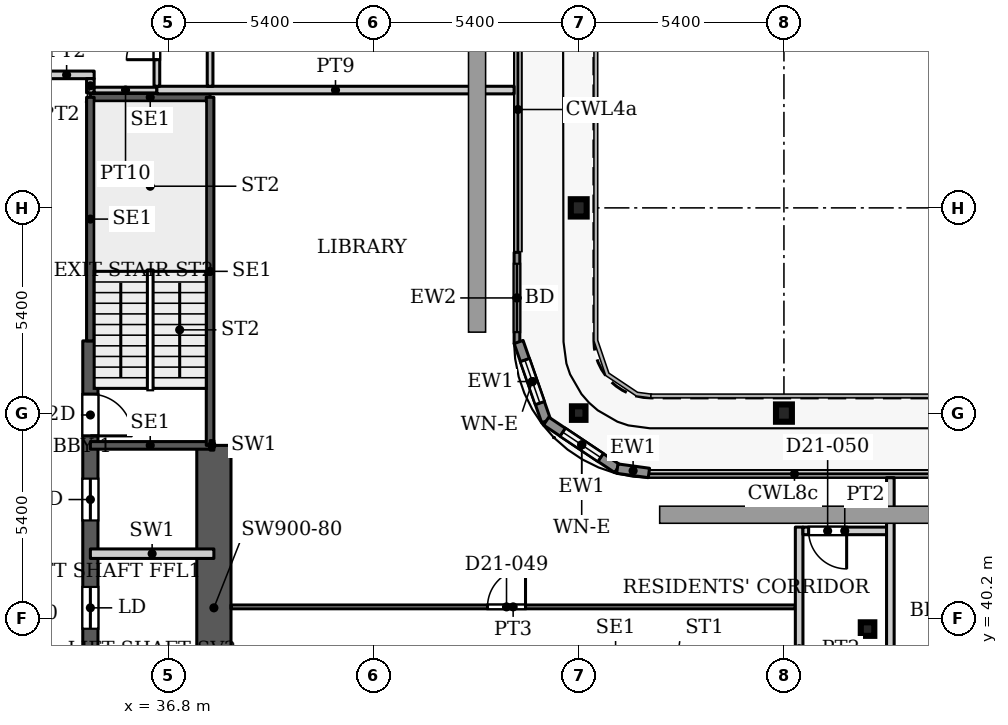
"""IFC4 building model, lengths in metres.
Left out: names, types, materials, properties, quantities, classifications, styles, units other than length and angle.
Written with IfcOpenShell. Run it as: python <this file> out.ifc"""

import sys

from ifc_helpers import new_model, si_unit, direction, frame, frame_2d, origin, origin_2d, place, context, subcontext, project, spatial, rectangle, hollow_rectangle, i_section, extrude, source, transform, mapped, element, fill, save


model = new_model("IFC4")
c1 = context("Model", 3, precision=1e-05, world=origin(), true_north=direction((0.0, 1.0)))
c2 = subcontext(c1, "Body", "Model", "MODEL_VIEW")
j1 = project(units=[si_unit("LENGTHUNIT", "METRE"), si_unit("PLANEANGLEUNIT", "RADIAN")], contexts=[c1])
p1 = place(None, origin())
s1 = spatial("IfcSite", under=j1, at=p1, CompositionType="ELEMENT")
p2 = place(p1, origin())
s2 = spatial("IfcBuilding", under=s1, at=p2, CompositionType="ELEMENT")
p3 = place(p2, frame((0.0, 0.0, 98.0)))
s3 = spatial("IfcBuildingStorey", under=s2, at=p3, CompositionType="ELEMENT", Elevation=98.0)
for number, where, z_axis, x_axis in (
    (1, (53.0, 45.6, 0.0), (0.0, 0.0, 1.0), (1.0, 0.0, 0.0)),
    (2, (47.6, 51.0, 0.0), (0.0, 0.0, 1.0), (1.0, 0.0, 0.0)),
):
    element("IfcColumn", number, at=place(p3, frame(where, z_axis=z_axis, x_axis=x_axis)), inside=s3, PredefinedType="COLUMN", context=c2, shape_type="SweptSolid", body=[
        extrude(i_section(OverallWidth=0.418, OverallDepth=0.455, WebThickness=0.042, FlangeThickness=0.068, FilletRadius=0.014, at=origin_2d()), origin(), (0.0, 0.0, 1.0), 3.9),
    ])
for number, where, z_axis, x_axis in (
    (3, (55.2, 39.916, 0.0), (0.0, 0.0, 1.0), (1.0, 0.0, 0.0)),
    (4, (47.6, 45.6, 0.0), (0.0, 0.0, 1.0), (1.0, 0.0, 0.0)),
):
    element("IfcColumn", number, at=place(p3, frame(where, z_axis=z_axis, x_axis=x_axis)), inside=s3, PredefinedType="COLUMN", context=c2, shape_type="SweptSolid", body=[
        extrude(hollow_rectangle(XDim=0.356, YDim=0.356, WallThickness=0.016, InnerFilletRadius=0.016, OuterFilletRadius=0.032, at=origin_2d()), origin(), (0.0, 0.0, 1.0), 3.9),
    ])
p4 = place(p3, frame((34.75, 29.05, 0.0), z_axis=(0.0, 0.0, 1.0), x_axis=(0.0, 1.0, 0.0)))
e5 = element("IfcWall", 5, at=p4, inside=s3, PredefinedType="SHEAR", context=c2, shape_type="SweptSolid", body=[
    extrude(rectangle(XDim=18.45, YDim=0.4, at=frame_2d((9.225, 0.0))), origin(), (0.0, 0.0, 1.0), 3.9),
])
p5 = place(p4, frame((8.025, 0.0, 0.0)))
e6 = element("IfcOpeningElement", 6, at=p5, cuts=e5, PredefinedType="OPENING", context=c2, shape_type="SweptSolid", body=[
    extrude(rectangle(XDim=1.1, YDim=2.2, at=frame_2d((0.55, 1.1))), frame((0.0, 0.21, 0.0), z_axis=(0.0, -1.0, 0.0), x_axis=(1.0, 0.0, 0.0)), (0.0, 0.0, 1.0), 0.42),
])
p6 = place(p4, frame((10.875, 0.0, 0.0)))
e7 = element("IfcOpeningElement", 7, at=p6, cuts=e5, PredefinedType="OPENING", context=c2, shape_type="SweptSolid", body=[
    extrude(rectangle(XDim=1.1, YDim=2.2, at=frame_2d((0.55, 1.1))), frame((0.0, 0.21, 0.0), z_axis=(0.0, -1.0, 0.0), x_axis=(1.0, 0.0, 0.0)), (0.0, 0.0, 1.0), 0.42),
])
p7 = place(p4, frame((13.725, 0.0, 0.0)))
e8 = element("IfcOpeningElement", 8, at=p7, cuts=e5, PredefinedType="OPENING", context=c2, shape_type="SweptSolid", body=[
    extrude(rectangle(XDim=1.1, YDim=2.2, at=frame_2d((0.55, 1.1))), frame((0.0, 0.21, 0.0), z_axis=(0.0, -1.0, 0.0), x_axis=(1.0, 0.0, 0.0)), (0.0, 0.0, 1.0), 0.42),
])
p8 = place(p4, frame((15.95, 0.0, 0.0)))
e9 = element("IfcOpeningElement", 9, at=p8, cuts=e5, PredefinedType="OPENING", context=c2, shape_type="SweptSolid", body=[
    extrude(rectangle(XDim=1.1, YDim=2.2, at=frame_2d((0.55, 1.1))), frame((0.0, 0.21, 0.0), z_axis=(0.0, -1.0, 0.0), x_axis=(1.0, 0.0, 0.0)), (0.0, 0.0, 1.0), 0.42),
])
p9 = place(p3, frame((38.0, 36.2, 0.0), z_axis=(0.0, 0.0, 1.0), x_axis=(0.0, 1.0, 0.0)))
e10 = element("IfcWall", 10, at=p9, inside=s3, PredefinedType="SHEAR", context=c2, shape_type="SweptSolid", body=[
    extrude(rectangle(XDim=8.55, YDim=0.9, at=frame_2d((4.275, 0.0))), origin(), (0.0, 0.0, 1.0), 3.9),
])
p10 = place(p3, frame((45.975, 49.83, 0.0), z_axis=(0.0, 0.0, 1.0), x_axis=(0.0, -1.0, 0.0)))
e11 = element("IfcWall", 11, at=p10, inside=s3, PredefinedType="SOLIDWALL", context=c2, shape_type="SweptSolid", body=[
    extrude(rectangle(XDim=2.4, YDim=0.15, at=frame_2d((1.2, 0.0))), origin(), (0.0, 0.0, 1.0), 3.75),
])
p11 = place(p10, frame((0.3, 0.0, 0.0)))
e12 = element("IfcOpeningElement", 12, at=p11, cuts=e11, PredefinedType="OPENING", context=c2, shape_type="SweptSolid", body=[
    extrude(rectangle(XDim=1.8, YDim=2.4, at=frame_2d((0.9, 1.2))), frame((0.0, 0.085, 0.0), z_axis=(0.0, -1.0, 0.0), x_axis=(1.0, 0.0, 0.0)), (0.0, 0.0, 1.0), 0.17),
])
p12 = place(p3, frame((46.018, 47.471, 0.0), z_axis=(0.0, 0.0, 1.0), x_axis=(0.328791208903, -0.944402637093, 0.0)))
e13 = element("IfcWall", 13, at=p12, inside=s3, PredefinedType="SOLIDWALL", context=c2, shape_type="SweptSolid", body=[
    extrude(rectangle(XDim=2.205, YDim=0.25, at=frame_2d((1.102, 0.0))), origin(), (0.0, 0.0, 1.0), 3.75),
])
p13 = place(p12, frame((0.503, 0.0, 0.6)))
e14 = element("IfcOpeningElement", 14, at=p13, cuts=e13, PredefinedType="OPENING", context=c2, shape_type="SweptSolid", body=[
    extrude(rectangle(XDim=1.2, YDim=2.1, at=frame_2d((0.6, 1.05))), frame((0.0, 0.135, 0.0), z_axis=(0.0, -1.0, 0.0), x_axis=(1.0, 0.0, 0.0)), (0.0, 0.0, 1.0), 0.27),
])
p14 = place(p3, frame((46.743, 45.389, 0.0), z_axis=(0.0, 0.0, 1.0), x_axis=(0.831449265529, -0.555600682912, 0.0)))
e15 = element("IfcWall", 15, at=p14, inside=s3, PredefinedType="SOLIDWALL", context=c2, shape_type="SweptSolid", body=[
    extrude(rectangle(XDim=2.251, YDim=0.25, at=frame_2d((1.126, 0.0))), origin(), (0.0, 0.0, 1.0), 3.75),
])
p15 = place(p14, frame((0.525, 0.0, 0.6)))
e16 = element("IfcOpeningElement", 16, at=p15, cuts=e15, PredefinedType="OPENING", context=c2, shape_type="SweptSolid", body=[
    extrude(rectangle(XDim=1.2, YDim=2.1, at=frame_2d((0.6, 1.05))), frame((0.0, 0.135, 0.0), z_axis=(0.0, -1.0, 0.0), x_axis=(1.0, 0.0, 0.0)), (0.0, 0.0, 1.0), 0.27),
])
p16 = place(p3, frame((48.615, 44.138, 0.0), z_axis=(0.0, 0.0, 1.0), x_axis=(0.990741504246, -0.135761819977, 0.0)))
e17 = element("IfcWall", 17, at=p16, inside=s3, PredefinedType="SOLIDWALL", context=c2, shape_type="SweptSolid", body=[
    extrude(rectangle(XDim=0.84, YDim=0.25, at=frame_2d((0.42, 0.0))), origin(), (0.0, 0.0, 1.0), 3.75),
])
for number, where, z_axis, x_axis in (
    (18, (34.75, 44.75, 0.0), (0.0, 0.0, 1.0), (1.0, 0.0, 0.0)),
    (19, (34.75, 53.91, 0.0), (0.0, 0.0, 1.0), (1.0, 0.0, 0.0)),
):
    element("IfcWall", number, at=place(p3, frame(where, z_axis=z_axis, x_axis=x_axis)), inside=s3, PredefinedType="SHEAR", context=c2, shape_type="SweptSolid", body=[
        extrude(rectangle(XDim=3.15, YDim=0.2, at=frame_2d((1.575, 0.0))), origin(), (0.0, 0.0, 1.0), 3.9),
    ])
p17 = place(p3, frame((34.75, 47.5, 0.0), z_axis=(0.0, 0.0, 1.0), x_axis=(0.0, 1.0, 0.0)))
e20 = element("IfcWall", 20, at=p17, inside=s3, PredefinedType="SHEAR", context=c2, shape_type="SweptSolid", body=[
    extrude(rectangle(XDim=6.41, YDim=0.2, at=frame_2d((3.205, 0.0))), origin(), (0.0, 0.0, 1.0), 3.9),
])
p18 = place(p3, frame((37.9, 44.75, 0.0), z_axis=(0.0, 0.0, 1.0), x_axis=(0.0, 1.0, 0.0)))
e21 = element("IfcWall", 21, at=p18, inside=s3, PredefinedType="SHEAR", context=c2, shape_type="SweptSolid", body=[
    extrude(rectangle(XDim=9.16, YDim=0.2, at=frame_2d((4.58, 0.0))), origin(), (0.0, 0.0, 1.0), 3.9),
])
p19 = place(p3, frame((34.75, 41.9, 0.0), z_axis=(0.0, 0.0, 1.0), x_axis=(1.0, 0.0, 0.0)))
e22 = element("IfcWall", 22, at=p19, inside=s3, PredefinedType="PARTITIONING", context=c2, shape_type="SweptSolid", body=[
    extrude(rectangle(XDim=3.25, YDim=0.25, at=frame_2d((1.625, 0.0))), origin(), (0.0, 0.0, 1.0), 3.9),
])
p20 = place(p3, frame((37.9, 44.75, 0.0), z_axis=(0.0, 0.0, 1.0), x_axis=(1.0, 0.0, 0.0)))
e23 = element("IfcWall", 23, at=p20, inside=s3, PredefinedType="PARTITIONING", context=c2, shape_type="SweptSolid", body=[
    extrude(rectangle(XDim=0.1, YDim=0.25, at=frame_2d((0.05, 0.0))), origin(), (0.0, 0.0, 1.0), 3.9),
])
p21 = place(p3, frame((33.4, 54.5, 0.0), z_axis=(0.0, 0.0, 1.0), x_axis=(1.0, 0.0, 0.0)))
e24 = element("IfcWall", 24, at=p21, inside=s3, PredefinedType="PARTITIONING", context=c2, shape_type="SweptSolid", body=[
    extrude(rectangle(XDim=1.45, YDim=0.2, at=frame_2d((0.725, 0.0))), origin(), (0.0, 0.0, 1.0), 3.6),
])
p22 = place(p3, frame((34.75, 54.025, 0.0), z_axis=(0.0, 0.0, 1.0), x_axis=(0.0, 1.0, 0.0)))
e25 = element("IfcWall", 25, at=p22, inside=s3, PredefinedType="PARTITIONING", context=c2, shape_type="SweptSolid", body=[
    extrude(rectangle(XDim=0.375, YDim=0.2, at=frame_2d((0.188, 0.0))), origin(), (0.0, 0.0, 1.0), 3.6),
])
p23 = place(p3, frame((34.85, 54.1, 0.0), z_axis=(0.0, 0.0, 1.0), x_axis=(1.0, 0.0, 0.0)))
e26 = element("IfcWall", 26, at=p23, inside=s3, PredefinedType="PARTITIONING", context=c2, shape_type="SweptSolid", body=[
    extrude(rectangle(XDim=1.65, YDim=0.15, at=frame_2d((0.825, 0.0))), origin(), (0.0, 0.0, 1.0), 3.6),
])
p24 = place(p3, frame((36.5, 54.1, 0.0), z_axis=(0.0, 0.0, 1.0), x_axis=(1.0, 0.0, 0.0)))
e27 = element("IfcWall", 27, at=p24, inside=s3, PredefinedType="PARTITIONING", context=c2, shape_type="SweptSolid", body=[
    extrude(rectangle(XDim=9.4, YDim=0.2, at=frame_2d((4.7, 0.0))), origin(), (0.0, 0.0, 1.0), 3.6),
])
p25 = place(p3, frame((36.5, 54.2, 0.0), z_axis=(0.0, 0.0, 1.0), x_axis=(0.0, 1.0, 0.0)))
e28 = element("IfcWall", 28, at=p25, inside=s3, PredefinedType="PARTITIONING", context=c2, shape_type="SweptSolid", body=[
    extrude(rectangle(XDim=5.35, YDim=0.15, at=frame_2d((2.675, 0.0))), origin(), (0.0, 0.0, 1.0), 3.6),
])
p26 = place(p25, frame((0.7, 0.0, 0.0)))
e29 = element("IfcOpeningElement", 29, at=p26, cuts=e28, PredefinedType="OPENING", context=c2, shape_type="SweptSolid", body=[
    extrude(rectangle(XDim=0.8, YDim=2.1, at=frame_2d((0.4, 1.05))), frame((0.0, 0.085, 0.0), z_axis=(0.0, -1.0, 0.0), x_axis=(1.0, 0.0, 0.0)), (0.0, 0.0, 1.0), 0.17),
])
p27 = place(p25, frame((3.35, 0.0, 0.0)))
e30 = element("IfcOpeningElement", 30, at=p27, cuts=e28, PredefinedType="OPENING", context=c2, shape_type="SweptSolid", body=[
    extrude(rectangle(XDim=0.9, YDim=2.1, at=frame_2d((0.45, 1.05))), frame((0.0, 0.085, 0.0), z_axis=(0.0, -1.0, 0.0), x_axis=(1.0, 0.0, 0.0)), (0.0, 0.0, 1.0), 0.17),
])
p28 = place(p3, frame((37.9, 54.2, 0.0), z_axis=(0.0, 0.0, 1.0), x_axis=(0.0, 1.0, 0.0)))
e31 = element("IfcWall", 31, at=p28, inside=s3, PredefinedType="PARTITIONING", context=c2, shape_type="SweptSolid", body=[
    extrude(rectangle(XDim=8.5, YDim=0.15, at=frame_2d((4.25, 0.0))), origin(), (0.0, 0.0, 1.0), 3.6),
])
p29 = place(p28, frame((1.1, 0.0, 0.0)))
e32 = element("IfcOpeningElement", 32, at=p29, cuts=e31, PredefinedType="OPENING", context=c2, shape_type="SweptSolid", body=[
    extrude(rectangle(XDim=0.9, YDim=2.1, at=frame_2d((0.45, 1.05))), frame((0.0, 0.085, 0.0), z_axis=(0.0, -1.0, 0.0), x_axis=(1.0, 0.0, 0.0)), (0.0, 0.0, 1.0), 0.17),
])
p30 = place(p28, frame((5.4, 0.0, 0.0)))
e33 = element("IfcOpeningElement", 33, at=p30, cuts=e31, PredefinedType="OPENING", context=c2, shape_type="SweptSolid", body=[
    extrude(rectangle(XDim=1.0, YDim=2.1, at=frame_2d((0.5, 1.05))), frame((0.0, 0.085, 0.0), z_axis=(0.0, -1.0, 0.0), x_axis=(1.0, 0.0, 0.0)), (0.0, 0.0, 1.0), 0.17),
])
p31 = place(p3, frame((38.449, 40.5, 0.0), z_axis=(0.0, 0.0, 1.0), x_axis=(1.0, 0.0, 0.0)))
e34 = element("IfcWall", 34, at=p31, inside=s3, PredefinedType="PARTITIONING", context=c2, shape_type="SweptSolid", body=[
    extrude(rectangle(XDim=14.851, YDim=0.1, at=frame_2d((7.426, 0.0))), origin(), (0.0, 0.0, 1.0), 3.6),
])
p32 = place(p31, frame((6.751, 0.0, 0.0)))
e35 = element("IfcOpeningElement", 35, at=p32, cuts=e34, PredefinedType="OPENING", context=c2, shape_type="SweptSolid", body=[
    extrude(rectangle(XDim=1.0, YDim=2.1, at=frame_2d((0.5, 1.05))), frame((0.0, 0.06, 0.0), z_axis=(0.0, -1.0, 0.0), x_axis=(1.0, 0.0, 0.0)), (0.0, 0.0, 1.0), 0.12),
])
p33 = place(p3, frame((53.4, 36.199, 0.0), z_axis=(0.0, 0.0, 1.0), x_axis=(0.0, 1.0, 0.0)))
e36 = element("IfcWall", 36, at=p33, inside=s3, PredefinedType="PARTITIONING", context=c2, shape_type="SweptSolid", body=[
    extrude(rectangle(XDim=6.401, YDim=0.2, at=frame_2d((3.201, 0.0))), origin(), (0.0, 0.0, 1.0), 3.6),
])
p34 = place(p3, frame((53.5, 42.5, 0.0), z_axis=(0.0, 0.0, 1.0), x_axis=(1.0, 0.0, 0.0)))
e37 = element("IfcWall", 37, at=p34, inside=s3, PredefinedType="PARTITIONING", context=c2, shape_type="SweptSolid", body=[
    extrude(rectangle(XDim=2.2, YDim=0.2, at=frame_2d((1.1, 0.0))), origin(), (0.0, 0.0, 1.0), 3.6),
])
p35 = place(p34, frame((0.15, 0.0, 0.0)))
e38 = element("IfcOpeningElement", 38, at=p35, cuts=e37, PredefinedType="OPENING", context=c2, shape_type="SweptSolid", body=[
    extrude(rectangle(XDim=1.0, YDim=2.1, at=frame_2d((0.5, 1.05))), frame((0.0, 0.11, 0.0), z_axis=(0.0, -1.0, 0.0), x_axis=(1.0, 0.0, 0.0)), (0.0, 0.0, 1.0), 0.22),
])
p36 = place(p3, frame((55.8, 30.4, 0.0), z_axis=(0.0, 0.0, 1.0), x_axis=(0.0, 1.0, 0.0)))
e39 = element("IfcWall", 39, at=p36, inside=s3, PredefinedType="PARTITIONING", context=c2, shape_type="SweptSolid", body=[
    extrude(rectangle(XDim=13.5, YDim=0.2, at=frame_2d((6.75, 0.0))), origin(), (0.0, 0.0, 1.0), 3.6),
])
m1 = source(origin(), c2, "Body", "SweptSolid", [
    extrude(rectangle(XDim=1.8, YDim=2.4, at=frame_2d((0.9, 1.2))), frame((0.0, 0.025, 0.0), z_axis=(0.0, -1.0, 0.0), x_axis=(1.0, 0.0, 0.0)), (0.0, 0.0, 1.0), 0.05),
])
p37 = place(p11, origin())
e40 = element("IfcDoor", 40, at=p37, inside=s3, OperationType="SLIDING_TO_LEFT", PredefinedType="DOOR", context=c2, shape_type="MappedRepresentation", body=[
    mapped(m1, transform((0.0, 0.0, 0.0), x_axis=(1.0, 0.0, 0.0), y_axis=(0.0, 1.0, 0.0), z_axis=(0.0, 0.0, 1.0), scale=1.0)),
])
fill(e12, e40)
m2 = source(origin(), c2, "Body", "SweptSolid", [
    extrude(rectangle(XDim=1.2, YDim=2.1, at=frame_2d((0.6, 1.05))), frame((0.0, 0.03, 0.0), z_axis=(0.0, -1.0, 0.0), x_axis=(1.0, 0.0, 0.0)), (0.0, 0.0, 1.0), 0.06),
])
p38 = place(p13, origin())
e41 = element("IfcWindow", 41, at=p38, inside=s3, PartitioningType="SINGLE_PANEL", PredefinedType="WINDOW", context=c2, shape_type="MappedRepresentation", body=[
    mapped(m2, transform((0.0, 0.0, 0.0), x_axis=(1.0, 0.0, 0.0), y_axis=(0.0, 1.0, 0.0), z_axis=(0.0, 0.0, 1.0), scale=1.0)),
])
fill(e14, e41)
p39 = place(p15, origin())
e42 = element("IfcWindow", 42, at=p39, inside=s3, PartitioningType="SINGLE_PANEL", PredefinedType="WINDOW", context=c2, shape_type="MappedRepresentation", body=[
    mapped(m2, transform((0.0, 0.0, 0.0), x_axis=(1.0, 0.0, 0.0), y_axis=(0.0, 1.0, 0.0), z_axis=(0.0, 0.0, 1.0), scale=1.0)),
])
fill(e16, e42)
m3 = source(origin(), c2, "Body", "SweptSolid", [
    extrude(rectangle(XDim=1.1, YDim=2.2, at=frame_2d((0.55, 1.1))), frame((0.0, 0.025, 0.0), z_axis=(0.0, -1.0, 0.0), x_axis=(1.0, 0.0, 0.0)), (0.0, 0.0, 1.0), 0.05),
])
p40 = place(p6, origin())
e43 = element("IfcDoor", 43, at=p40, inside=s3, OperationType="SLIDING_TO_LEFT", PredefinedType="DOOR", context=c2, shape_type="MappedRepresentation", body=[
    mapped(m3, transform((0.0, 0.0, 0.0), x_axis=(1.0, 0.0, 0.0), y_axis=(0.0, 1.0, 0.0), z_axis=(0.0, 0.0, 1.0), scale=1.0)),
])
fill(e7, e43)
p41 = place(p7, origin())
e44 = element("IfcDoor", 44, at=p41, inside=s3, OperationType="SLIDING_TO_LEFT", PredefinedType="DOOR", context=c2, shape_type="MappedRepresentation", body=[
    mapped(m3, transform((0.0, 0.0, 0.0), x_axis=(1.0, 0.0, 0.0), y_axis=(0.0, 1.0, 0.0), z_axis=(0.0, 0.0, 1.0), scale=1.0)),
])
fill(e8, e44)
m4 = source(origin(), c2, "Body", "SweptSolid", [
    extrude(rectangle(XDim=1.1, YDim=2.2, at=frame_2d((0.55, 1.1))), frame((0.0, 0.025, 0.0), z_axis=(0.0, -1.0, 0.0), x_axis=(1.0, 0.0, 0.0)), (0.0, 0.0, 1.0), 0.05),
])
p42 = place(p8, origin())
e45 = element("IfcDoor", 45, at=p42, inside=s3, OperationType="SINGLE_SWING_RIGHT", PredefinedType="DOOR", context=c2, shape_type="MappedRepresentation", body=[
    mapped(m4, transform((0.0, 0.0, 0.0), x_axis=(1.0, 0.0, 0.0), y_axis=(0.0, 1.0, 0.0), z_axis=(0.0, 0.0, 1.0), scale=1.0)),
])
fill(e9, e45)
m5 = source(origin(), c2, "Body", "SweptSolid", [
    extrude(rectangle(XDim=0.8, YDim=2.1, at=frame_2d((0.4, 1.05))), frame((0.0, 0.025, 0.0), z_axis=(0.0, -1.0, 0.0), x_axis=(1.0, 0.0, 0.0)), (0.0, 0.0, 1.0), 0.05),
])
p43 = place(p26, origin())
e46 = element("IfcDoor", 46, at=p43, inside=s3, OperationType="SINGLE_SWING_LEFT", PredefinedType="DOOR", context=c2, shape_type="MappedRepresentation", body=[
    mapped(m5, transform((0.0, 0.0, 0.0), x_axis=(1.0, 0.0, 0.0), y_axis=(0.0, 1.0, 0.0), z_axis=(0.0, 0.0, 1.0), scale=1.0)),
])
fill(e29, e46)
m6 = source(origin(), c2, "Body", "SweptSolid", [
    extrude(rectangle(XDim=1.0, YDim=2.1, at=frame_2d((0.5, 1.05))), frame((0.0, 0.025, 0.0), z_axis=(0.0, -1.0, 0.0), x_axis=(1.0, 0.0, 0.0)), (0.0, 0.0, 1.0), 0.05),
])
p44 = place(p32, origin())
e47 = element("IfcDoor", 47, at=p44, inside=s3, OperationType="SINGLE_SWING_LEFT", PredefinedType="DOOR", context=c2, shape_type="MappedRepresentation", body=[
    mapped(m6, transform((0.0, 0.0, 0.0), x_axis=(1.0, 0.0, 0.0), y_axis=(0.0, 1.0, 0.0), z_axis=(0.0, 0.0, 1.0), scale=1.0)),
])
fill(e35, e47)
m7 = source(origin(), c2, "Body", "SweptSolid", [
    extrude(rectangle(XDim=1.0, YDim=2.1, at=frame_2d((0.5, 1.05))), frame((0.0, 0.025, 0.0), z_axis=(0.0, -1.0, 0.0), x_axis=(1.0, 0.0, 0.0)), (0.0, 0.0, 1.0), 0.05),
])
p45 = place(p35, origin())
e48 = element("IfcDoor", 48, at=p45, inside=s3, OperationType="SINGLE_SWING_RIGHT", PredefinedType="DOOR", context=c2, shape_type="MappedRepresentation", body=[
    mapped(m7, transform((0.0, 0.0, 0.0), x_axis=(1.0, 0.0, 0.0), y_axis=(0.0, 1.0, 0.0), z_axis=(0.0, 0.0, 1.0), scale=1.0)),
])
fill(e38, e48)
save(model, sys.argv[1])
